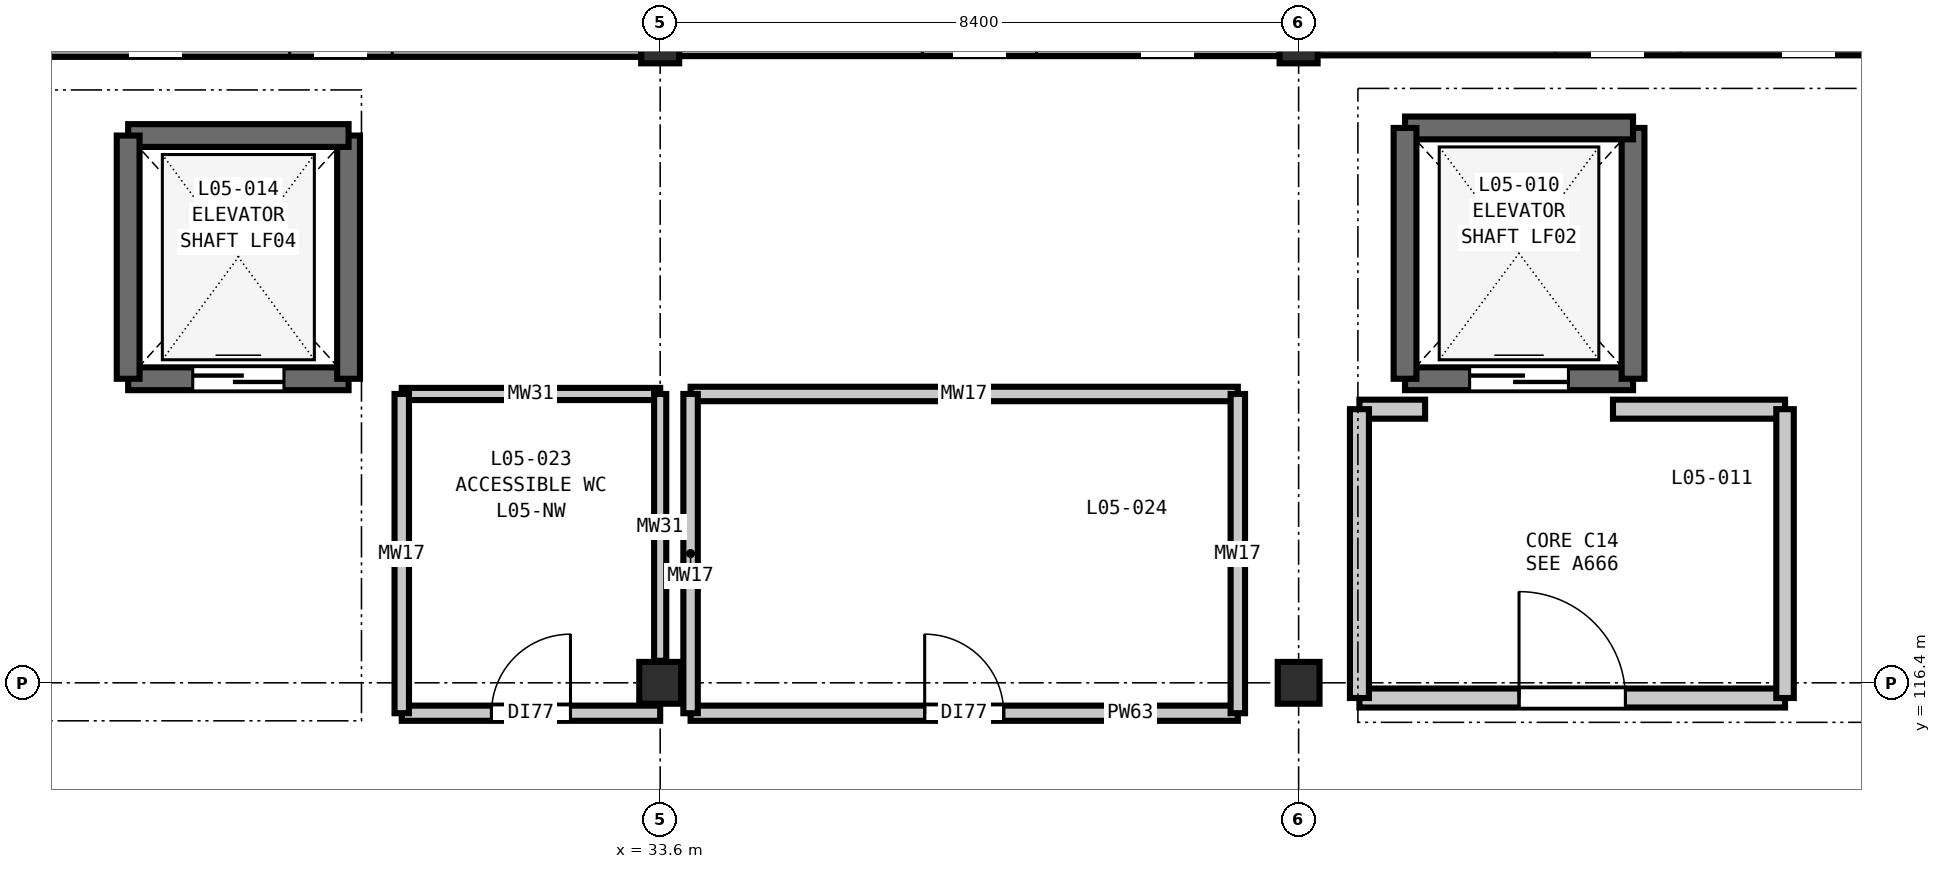
"""IFC4 building model, lengths in metres.
Left out: names, types, materials, properties, quantities, classifications, styles, units other than length and angle.
Written with IfcOpenShell. Run it as: python <this file> out.ifc"""

import sys

from ifc_helpers import new_model, si_unit, direction, frame, frame_2d, origin, origin_2d, place, context, subcontext, project, spatial, rectangle, extrude, element, fill, save


model = new_model("IFC4")
c1 = context("Model", 3, precision=1e-05, world=origin(), true_north=direction((0.0, 1.0)))
c2 = subcontext(c1, "Body", "Model", "MODEL_VIEW")
j1 = project(units=[si_unit("LENGTHUNIT", "METRE"), si_unit("PLANEANGLEUNIT", "RADIAN")], contexts=[c1])
p1 = place(None, origin())
s1 = spatial("IfcSite", under=j1, at=p1, CompositionType="ELEMENT")
p2 = place(p1, origin())
s2 = spatial("IfcBuilding", under=s1, at=p2, CompositionType="ELEMENT")
p3 = place(p2, frame((0.0, 0.0, 24.6)))
s3 = spatial("IfcBuildingStorey", under=s2, at=p3, CompositionType="ELEMENT", Elevation=24.6)
p4 = place(p3, frame((33.6, 116.4, 0.0), z_axis=(0.0, 0.0, 1.0), x_axis=(1.0, 0.0, 0.0)))
e1 = element("IfcColumn", 1, at=p4, inside=s3, PredefinedType="COLUMN", context=c2, shape_type="SweptSolid", body=[
    extrude(rectangle(XDim=0.55, YDim=0.55, at=origin_2d()), origin(), (0.0, 0.0, 1.0), 4.2),
])
p5 = place(p3, frame((33.6, 124.8, 0.0), z_axis=(0.0, 0.0, 1.0), x_axis=(1.0, 0.0, 0.0)))
e2 = element("IfcColumn", 2, at=p5, inside=s3, PredefinedType="COLUMN", context=c2, shape_type="SweptSolid", body=[
    extrude(rectangle(XDim=0.5, YDim=0.5, at=origin_2d()), origin(), (0.0, 0.0, 1.0), 4.2),
])
p6 = place(p3, frame((42.0, 116.4, 0.0), z_axis=(0.0, 0.0, 1.0), x_axis=(1.0, 0.0, 0.0)))
e3 = element("IfcColumn", 3, at=p6, inside=s3, PredefinedType="COLUMN", context=c2, shape_type="SweptSolid", body=[
    extrude(rectangle(XDim=0.55, YDim=0.55, at=origin_2d()), origin(), (0.0, 0.0, 1.0), 4.2),
])
p7 = place(p3, frame((42.0, 124.8, 0.0), z_axis=(0.0, 0.0, 1.0), x_axis=(1.0, 0.0, 0.0)))
e4 = element("IfcColumn", 4, at=p7, inside=s3, PredefinedType="COLUMN", context=c2, shape_type="SweptSolid", body=[
    extrude(rectangle(XDim=0.5, YDim=0.5, at=origin_2d()), origin(), (0.0, 0.0, 1.0), 4.2),
])
p8 = place(p3, frame((25.448, 124.8, 0.0), z_axis=(0.0, 0.0, 1.0), x_axis=(1.0, 0.0, 0.0)))
e5 = element("IfcWall", 5, at=p8, inside=s3, PredefinedType="SOLIDWALL", context=c2, shape_type="SweptSolid", body=[
    extrude(rectangle(XDim=7.904, YDim=0.33, at=frame_2d((3.952, 0.0))), origin(), (0.0, 0.0, 1.0), 3.48),
])
p9 = place(p8, frame((3.277, 0.0, 0.9)))
e6 = element("IfcOpeningElement", 6, at=p9, cuts=e5, PredefinedType="OPENING", context=c2, shape_type="SweptSolid", body=[
    extrude(rectangle(XDim=1.35, YDim=1.55, at=frame_2d((0.675, 0.775))), frame((0.0, 0.175, 0.0), z_axis=(0.0, -1.0, 0.0), x_axis=(1.0, 0.0, 0.0)), (0.0, 0.0, 1.0), 0.35),
])
p10 = place(p3, frame((33.848, 124.8, 0.0), z_axis=(0.0, 0.0, 1.0), x_axis=(1.0, 0.0, 0.0)))
e7 = element("IfcWall", 7, at=p10, inside=s3, PredefinedType="SOLIDWALL", context=c2, shape_type="SweptSolid", body=[
    extrude(rectangle(XDim=7.904, YDim=0.31, at=frame_2d((3.952, 0.0))), origin(), (0.0, 0.0, 1.0), 3.48),
])
p11 = place(p10, frame((3.202, 0.0, 0.9)))
e8 = element("IfcOpeningElement", 8, at=p11, cuts=e7, PredefinedType="OPENING", context=c2, shape_type="SweptSolid", body=[
    extrude(rectangle(XDim=1.5, YDim=1.55, at=frame_2d((0.75, 0.775))), frame((0.0, 0.165, 0.0), z_axis=(0.0, -1.0, 0.0), x_axis=(1.0, 0.0, 0.0)), (0.0, 0.0, 1.0), 0.33),
])
p12 = place(p3, frame((42.248, 124.8, 0.0), z_axis=(0.0, 0.0, 1.0), x_axis=(1.0, 0.0, 0.0)))
e9 = element("IfcWall", 9, at=p12, inside=s3, PredefinedType="SOLIDWALL", context=c2, shape_type="SweptSolid", body=[
    extrude(rectangle(XDim=7.904, YDim=0.29, at=frame_2d((3.952, 0.0))), origin(), (0.0, 0.0, 1.0), 3.48),
])
p13 = place(p12, frame((3.127, 0.0, 0.9)))
e10 = element("IfcOpeningElement", 10, at=p13, cuts=e9, PredefinedType="OPENING", context=c2, shape_type="SweptSolid", body=[
    extrude(rectangle(XDim=1.65, YDim=1.55, at=frame_2d((0.825, 0.775))), frame((0.0, 0.155, 0.0), z_axis=(0.0, -1.0, 0.0), x_axis=(1.0, 0.0, 0.0)), (0.0, 0.0, 1.0), 0.31),
])
p14 = place(p3, frame((43.4, 120.4, 0.0), z_axis=(0.0, 0.0, 1.0), x_axis=(1.0, 0.0, 0.0)))
e11 = element("IfcWall", 11, at=p14, inside=s3, PredefinedType="SHEAR", context=c2, shape_type="SweptSolid", body=[
    extrude(rectangle(XDim=3.0, YDim=0.3, at=frame_2d((1.5, 0.0))), origin(), (0.0, 0.0, 1.0), 4.2),
])
p15 = place(p14, frame((0.85, 0.0, 0.0)))
e12 = element("IfcOpeningElement", 12, at=p15, cuts=e11, PredefinedType="OPENING", context=c2, shape_type="SweptSolid", body=[
    extrude(rectangle(XDim=1.3, YDim=2.2, at=frame_2d((0.65, 1.1))), frame((0.0, 0.16, 0.0), z_axis=(0.0, -1.0, 0.0), x_axis=(1.0, 0.0, 0.0)), (0.0, 0.0, 1.0), 0.32),
])
p16 = place(p3, frame((46.4, 120.4, 0.0), z_axis=(0.0, 0.0, 1.0), x_axis=(0.0, 1.0, 0.0)))
e13 = element("IfcWall", 13, at=p16, inside=s3, PredefinedType="SHEAR", context=c2, shape_type="SweptSolid", body=[
    extrude(rectangle(XDim=3.3, YDim=0.3, at=frame_2d((1.65, 0.0))), origin(), (0.0, 0.0, 1.0), 4.2),
])
p17 = place(p3, frame((46.4, 123.7, 0.0), z_axis=(0.0, 0.0, 1.0), x_axis=(-1.0, 0.0, 0.0)))
e14 = element("IfcWall", 14, at=p17, inside=s3, PredefinedType="SHEAR", context=c2, shape_type="SweptSolid", body=[
    extrude(rectangle(XDim=3.0, YDim=0.3, at=frame_2d((1.5, 0.0))), origin(), (0.0, 0.0, 1.0), 4.2),
])
p18 = place(p3, frame((43.4, 123.7, 0.0), z_axis=(0.0, 0.0, 1.0), x_axis=(0.0, -1.0, 0.0)))
e15 = element("IfcWall", 15, at=p18, inside=s3, PredefinedType="SHEAR", context=c2, shape_type="SweptSolid", body=[
    extrude(rectangle(XDim=3.3, YDim=0.3, at=frame_2d((1.65, 0.0))), origin(), (0.0, 0.0, 1.0), 4.2),
])
p19 = place(p3, frame((26.6, 120.4, 0.0), z_axis=(0.0, 0.0, 1.0), x_axis=(1.0, 0.0, 0.0)))
e16 = element("IfcWall", 16, at=p19, inside=s3, PredefinedType="SHEAR", context=c2, shape_type="SweptSolid", body=[
    extrude(rectangle(XDim=2.9, YDim=0.3, at=frame_2d((1.45, 0.0))), origin(), (0.0, 0.0, 1.0), 4.2),
])
p20 = place(p19, frame((0.85, 0.0, 0.0)))
e17 = element("IfcOpeningElement", 17, at=p20, cuts=e16, PredefinedType="OPENING", context=c2, shape_type="SweptSolid", body=[
    extrude(rectangle(XDim=1.2, YDim=2.2, at=frame_2d((0.6, 1.1))), frame((0.0, 0.16, 0.0), z_axis=(0.0, -1.0, 0.0), x_axis=(1.0, 0.0, 0.0)), (0.0, 0.0, 1.0), 0.32),
])
p21 = place(p3, frame((29.5, 120.4, 0.0), z_axis=(0.0, 0.0, 1.0), x_axis=(0.0, 1.0, 0.0)))
e18 = element("IfcWall", 18, at=p21, inside=s3, PredefinedType="SHEAR", context=c2, shape_type="SweptSolid", body=[
    extrude(rectangle(XDim=3.2, YDim=0.3, at=frame_2d((1.6, 0.0))), origin(), (0.0, 0.0, 1.0), 4.2),
])
p22 = place(p3, frame((29.5, 123.6, 0.0), z_axis=(0.0, 0.0, 1.0), x_axis=(-1.0, 0.0, 0.0)))
e19 = element("IfcWall", 19, at=p22, inside=s3, PredefinedType="SHEAR", context=c2, shape_type="SweptSolid", body=[
    extrude(rectangle(XDim=2.9, YDim=0.3, at=frame_2d((1.45, 0.0))), origin(), (0.0, 0.0, 1.0), 4.2),
])
p23 = place(p3, frame((26.6, 123.6, 0.0), z_axis=(0.0, 0.0, 1.0), x_axis=(0.0, -1.0, 0.0)))
e20 = element("IfcWall", 20, at=p23, inside=s3, PredefinedType="SHEAR", context=c2, shape_type="SweptSolid", body=[
    extrude(rectangle(XDim=3.2, YDim=0.3, at=frame_2d((1.6, 0.0))), origin(), (0.0, 0.0, 1.0), 4.2),
])
p24 = place(p3, frame((30.2, 116.0, 0.0), z_axis=(0.0, 0.0, 1.0), x_axis=(1.0, 0.0, 0.0)))
e21 = element("IfcWall", 21, at=p24, inside=s3, PredefinedType="PARTITIONING", context=c2, shape_type="SweptSolid", body=[
    extrude(rectangle(XDim=3.4, YDim=0.2, at=frame_2d((1.7, 0.0))), origin(), (0.0, 0.0, 1.0), 3.92),
])
p25 = place(p24, frame((1.18, 0.0, 0.0)))
e22 = element("IfcOpeningElement", 22, at=p25, cuts=e21, PredefinedType="OPENING", context=c2, shape_type="SweptSolid", body=[
    extrude(rectangle(XDim=1.04, YDim=2.1, at=frame_2d((0.52, 1.05))), frame((0.0, 0.11, 0.0), z_axis=(0.0, -1.0, 0.0), x_axis=(1.0, 0.0, 0.0)), (0.0, 0.0, 1.0), 0.22),
])
p26 = place(p3, frame((34.0, 116.0, 0.0), z_axis=(0.0, 0.0, 1.0), x_axis=(1.0, 0.0, 0.0)))
e23 = element("IfcWall", 23, at=p26, inside=s3, PredefinedType="PARTITIONING", context=c2, shape_type="SweptSolid", body=[
    extrude(rectangle(XDim=7.2, YDim=0.2, at=frame_2d((3.6, 0.0))), origin(), (0.0, 0.0, 1.0), 3.92),
])
p27 = place(p26, frame((3.08, 0.0, 0.0)))
e24 = element("IfcOpeningElement", 24, at=p27, cuts=e23, PredefinedType="OPENING", context=c2, shape_type="SweptSolid", body=[
    extrude(rectangle(XDim=1.04, YDim=2.1, at=frame_2d((0.52, 1.05))), frame((0.0, 0.11, 0.0), z_axis=(0.0, -1.0, 0.0), x_axis=(1.0, 0.0, 0.0)), (0.0, 0.0, 1.0), 0.22),
])
p28 = place(p3, frame((42.8, 116.2, 0.0), z_axis=(0.0, 0.0, 1.0), x_axis=(1.0, 0.0, 0.0)))
e25 = element("IfcWall", 25, at=p28, inside=s3, PredefinedType="PARTITIONING", context=c2, shape_type="SweptSolid", body=[
    extrude(rectangle(XDim=5.6, YDim=0.25, at=frame_2d((2.8, 0.0))), origin(), (0.0, 0.0, 1.0), 3.585),
])
p29 = place(p28, frame((2.1, 0.0, 0.0)))
e26 = element("IfcOpeningElement", 26, at=p29, cuts=e25, PredefinedType="OPENING", context=c2, shape_type="SweptSolid", body=[
    extrude(rectangle(XDim=1.4, YDim=2.2, at=frame_2d((0.7, 1.1))), frame((0.0, 0.135, 0.0), z_axis=(0.0, -1.0, 0.0), x_axis=(1.0, 0.0, 0.0)), (0.0, 0.0, 1.0), 0.27),
])
p30 = place(p3, frame((46.136, 120.0, 0.0), z_axis=(0.0, 0.0, 1.0), x_axis=(1.0, 0.0, 0.0)))
e27 = element("IfcWall", 27, at=p30, inside=s3, PredefinedType="PARTITIONING", context=c2, shape_type="SweptSolid", body=[
    extrude(rectangle(XDim=2.264, YDim=0.25, at=frame_2d((1.132, 0.0))), origin(), (0.0, 0.0, 1.0), 3.92),
])
p31 = place(p3, frame((42.8, 120.0, 0.0), z_axis=(0.0, 0.0, 1.0), x_axis=(1.0, 0.0, 0.0)))
e28 = element("IfcWall", 28, at=p31, inside=s3, PredefinedType="PARTITIONING", context=c2, shape_type="SweptSolid", body=[
    extrude(rectangle(XDim=0.864, YDim=0.25, at=frame_2d((0.432, 0.0))), origin(), (0.0, 0.0, 1.0), 3.92),
])
p32 = place(p3, frame((30.2, 120.2, 0.0), z_axis=(0.0, 0.0, 1.0), x_axis=(1.0, 0.0, 0.0)))
e29 = element("IfcWall", 29, at=p32, inside=s3, PredefinedType="PLUMBINGWALL", context=c2, shape_type="SweptSolid", body=[
    extrude(rectangle(XDim=3.4, YDim=0.16, at=frame_2d((1.7, 0.0))), origin(), (0.0, 0.0, 1.0), 3.92),
])
p33 = place(p3, frame((34.0, 120.2, 0.0), z_axis=(0.0, 0.0, 1.0), x_axis=(1.0, 0.0, 0.0)))
e30 = element("IfcWall", 30, at=p33, inside=s3, PredefinedType="PLUMBINGWALL", context=c2, shape_type="SweptSolid", body=[
    extrude(rectangle(XDim=7.2, YDim=0.19, at=frame_2d((3.6, 0.0))), origin(), (0.0, 0.0, 1.0), 3.92),
])
p34 = place(p3, frame((30.2, 116.0, 0.0), z_axis=(0.0, 0.0, 1.0), x_axis=(0.0, 1.0, 0.0)))
e31 = element("IfcWall", 31, at=p34, inside=s3, PredefinedType="PLUMBINGWALL", context=c2, shape_type="SweptSolid", body=[
    extrude(rectangle(XDim=4.2, YDim=0.19, at=frame_2d((2.1, 0.0))), origin(), (0.0, 0.0, 1.0), 3.92),
])
p35 = place(p3, frame((33.6, 116.69, 0.0), z_axis=(0.0, 0.0, 1.0), x_axis=(0.0, 1.0, 0.0)))
e32 = element("IfcWall", 32, at=p35, inside=s3, PredefinedType="PLUMBINGWALL", context=c2, shape_type="SweptSolid", body=[
    extrude(rectangle(XDim=3.51, YDim=0.16, at=frame_2d((1.755, 0.0))), origin(), (0.0, 0.0, 1.0), 3.635),
])
for number, where, z_axis, x_axis in (
    (33, (34.0, 116.0, 0.0), (0.0, 0.0, 1.0), (0.0, 1.0, 0.0)),
    (34, (41.2, 116.0, 0.0), (0.0, 0.0, 1.0), (0.0, 1.0, 0.0)),
):
    element("IfcWall", number, at=place(p3, frame(where, z_axis=z_axis, x_axis=x_axis)), inside=s3, PredefinedType="PLUMBINGWALL", context=c2, shape_type="SweptSolid", body=[
        extrude(rectangle(XDim=4.2, YDim=0.19, at=frame_2d((2.1, 0.0))), origin(), (0.0, 0.0, 1.0), 3.92),
    ])
p36 = place(p3, frame((42.8, 116.2, 0.0), z_axis=(0.0, 0.0, 1.0), x_axis=(0.0, 1.0, 0.0)))
e35 = element("IfcWall", 35, at=p36, inside=s3, PredefinedType="PARTITIONING", context=c2, shape_type="SweptSolid", body=[
    extrude(rectangle(XDim=3.8, YDim=0.25, at=frame_2d((1.9, 0.0))), origin(), (0.0, 0.0, 1.0), 3.92),
])
p37 = place(p3, frame((48.4, 116.2, 0.0), z_axis=(0.0, 0.0, 1.0), x_axis=(0.0, 1.0, 0.0)))
e36 = element("IfcWall", 36, at=p37, inside=s3, PredefinedType="PARTITIONING", context=c2, shape_type="SweptSolid", body=[
    extrude(rectangle(XDim=3.8, YDim=0.23, at=frame_2d((1.9, 0.0))), origin(), (0.0, 0.0, 1.0), 3.92),
])
p38 = place(p15, origin())
e37 = element("IfcDoor", 37, at=p38, inside=s3, OperationType="DOUBLE_DOOR_SLIDING", PredefinedType="DOOR", context=c2, shape_type="SweptSolid", body=[
    extrude(rectangle(XDim=1.3, YDim=2.2, at=frame_2d((0.65, 1.1))), frame((0.0, 0.025, 0.0), z_axis=(0.0, -1.0, 0.0), x_axis=(1.0, 0.0, 0.0)), (0.0, 0.0, 1.0), 0.05),
])
fill(e12, e37)
p39 = place(p20, origin())
e38 = element("IfcDoor", 38, at=p39, inside=s3, OperationType="DOUBLE_DOOR_SLIDING", PredefinedType="DOOR", context=c2, shape_type="SweptSolid", body=[
    extrude(rectangle(XDim=1.2, YDim=2.2, at=frame_2d((0.6, 1.1))), frame((0.0, 0.025, 0.0), z_axis=(0.0, -1.0, 0.0), x_axis=(1.0, 0.0, 0.0)), (0.0, 0.0, 1.0), 0.05),
])
fill(e17, e38)
p40 = place(p25, origin())
e39 = element("IfcDoor", 39, at=p40, inside=s3, OperationType="SINGLE_SWING_RIGHT", PredefinedType="DOOR", context=c2, shape_type="SweptSolid", body=[
    extrude(rectangle(XDim=1.04, YDim=2.1, at=frame_2d((0.52, 1.05))), frame((0.0, 0.025, 0.0), z_axis=(0.0, -1.0, 0.0), x_axis=(1.0, 0.0, 0.0)), (0.0, 0.0, 1.0), 0.05),
])
fill(e22, e39)
p41 = place(p27, origin())
e40 = element("IfcDoor", 40, at=p41, inside=s3, OperationType="SINGLE_SWING_LEFT", PredefinedType="DOOR", context=c2, shape_type="SweptSolid", body=[
    extrude(rectangle(XDim=1.04, YDim=2.1, at=frame_2d((0.52, 1.05))), frame((0.0, 0.025, 0.0), z_axis=(0.0, -1.0, 0.0), x_axis=(1.0, 0.0, 0.0)), (0.0, 0.0, 1.0), 0.05),
])
fill(e24, e40)
p42 = place(p29, origin())
e41 = element("IfcDoor", 41, at=p42, inside=s3, OperationType="SINGLE_SWING_LEFT", PredefinedType="DOOR", context=c2, shape_type="SweptSolid", body=[
    extrude(rectangle(XDim=1.4, YDim=2.2, at=frame_2d((0.7, 1.1))), frame((0.0, 0.025, 0.0), z_axis=(0.0, -1.0, 0.0), x_axis=(1.0, 0.0, 0.0)), (0.0, 0.0, 1.0), 0.05),
])
fill(e26, e41)
save(model, sys.argv[1])
